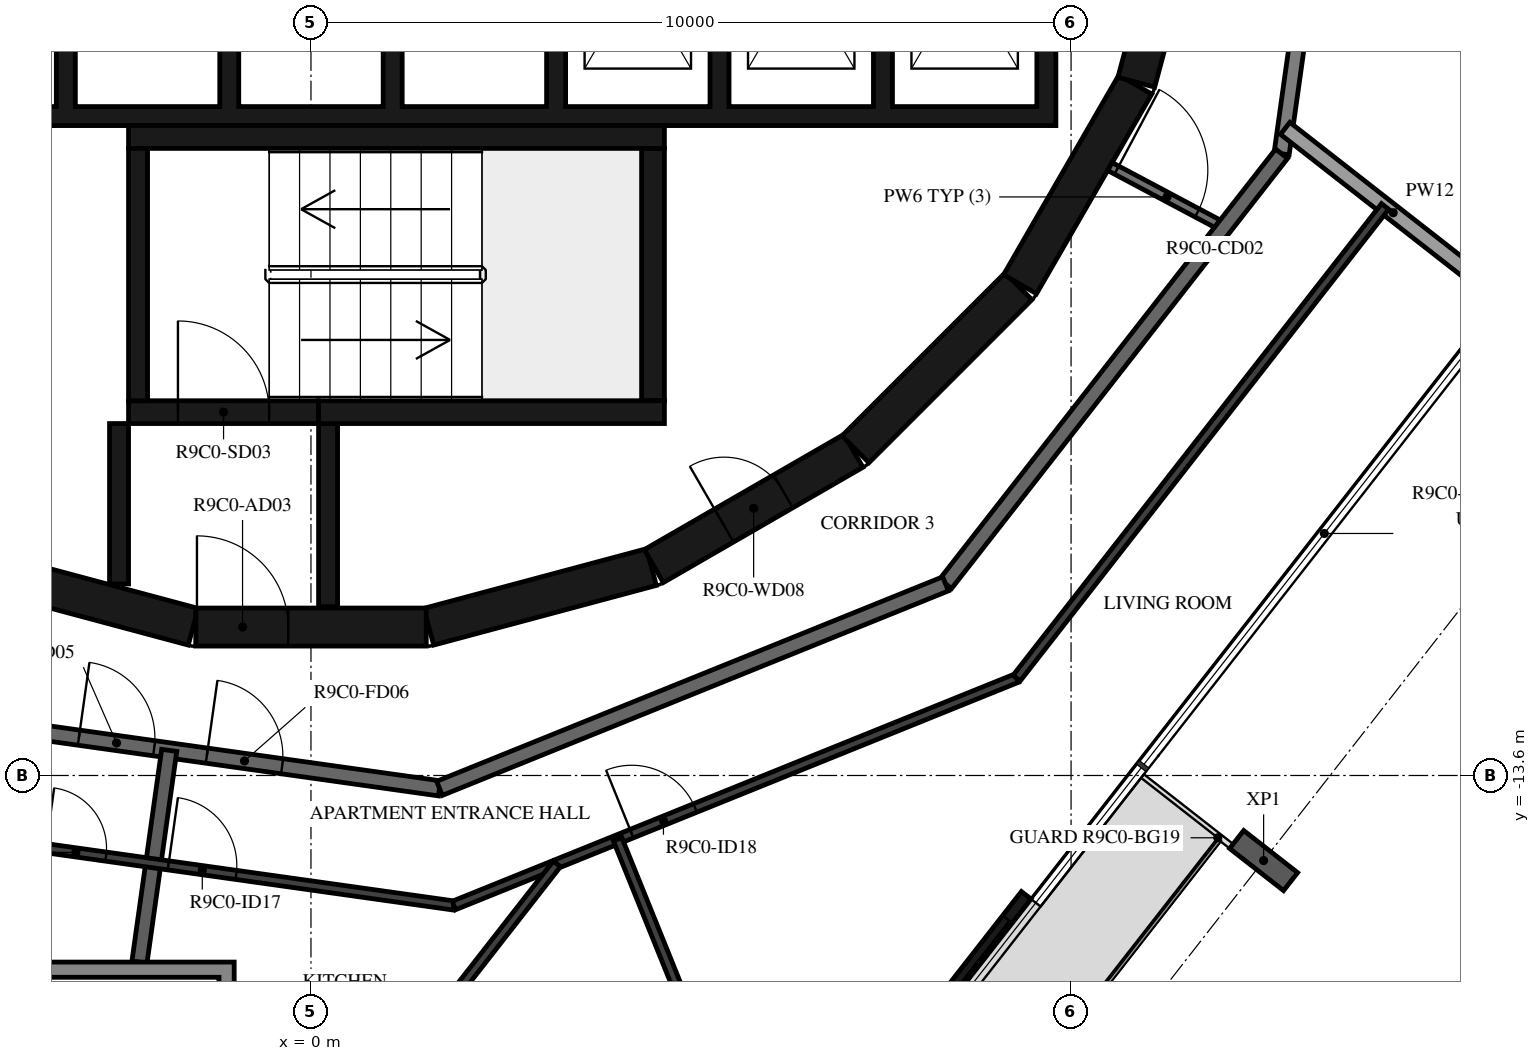
"""IFC4 building model, lengths in metres.
Left out: names, types, materials, properties, quantities, classifications, styles, units other than length and angle.
Written with IfcOpenShell. Run it as: python <this file> out.ifc"""

import sys

from ifc_helpers import new_model, si_unit, direction, frame, frame_2d, origin, origin_2d, place, context, subcontext, project, spatial, polyline, rectangle, i_section, outline, extrude, element, fill, save


model = new_model("IFC4")
c1 = context("Model", 3, precision=1e-05, world=origin(), true_north=direction((0.0, 1.0)))
c2 = subcontext(c1, "Body", "Model", "MODEL_VIEW")
j1 = project(units=[si_unit("LENGTHUNIT", "METRE"), si_unit("PLANEANGLEUNIT", "RADIAN")], contexts=[c1])
p1 = place(None, origin())
s1 = spatial("IfcSite", under=j1, at=p1, CompositionType="ELEMENT")
p2 = place(p1, origin())
s2 = spatial("IfcBuilding", under=s1, at=p2, CompositionType="ELEMENT")
p3 = place(p2, frame((0.0, 0.0, 354.0)))
s3 = spatial("IfcBuildingStorey", under=s2, at=p3, CompositionType="ELEMENT", Elevation=354.0)
p4 = place(p3, frame((12.533, -14.719, -0.38), z_axis=(0.0, 0.0, 1.0), x_axis=(-0.615661060634, -0.788011077599, 0.0)))
e1 = element("IfcColumn", 1, at=p4, inside=s3, PredefinedType="COLUMN", context=c2, shape_type="SweptSolid", body=[
    extrude(i_section(OverallWidth=0.3, OverallDepth=0.9, WebThickness=0.019, FlangeThickness=0.035, FilletRadius=0.03, at=origin_2d()), origin(), (0.0, 0.0, 1.0), 3.5),
])
p5 = place(p3, frame((7.44, -17.698, 0.0), z_axis=(0.0, 0.0, 1.0), x_axis=(0.615666248856, 0.788007024093, 0.0)))
e2 = element("IfcWall", 2, at=p5, inside=s3, PredefinedType="STANDARD", context=c2, shape_type="SweptSolid", body=[
    extrude(rectangle(XDim=3.2, YDim=0.16, at=frame_2d((1.6, 0.0))), origin(), (0.0, 0.0, 1.0), 3.12),
])
p6 = place(p5, frame((0.4, 0.0, 0.0)))
e3 = element("IfcOpeningElement", 3, at=p6, cuts=e2, PredefinedType="OPENING", context=c2, shape_type="SweptSolid", body=[
    extrude(rectangle(XDim=2.4, YDim=2.4, at=frame_2d((1.2, 1.2))), frame((0.0, 0.09, 0.0), z_axis=(0.0, -1.0, 0.0), x_axis=(1.0, 0.0, 0.0)), (0.0, 0.0, 1.0), 0.18),
])
p7 = place(p3, frame((1.55, -11.643, 0.0), z_axis=(0.0, 0.0, 1.0), x_axis=(0.965948410781, 0.258734743916, 0.0)))
e4 = element("IfcWall", 4, at=p7, inside=s3, PredefinedType="SHEAR", context=c2, shape_type="SweptSolid", body=[
    extrude(rectangle(XDim=3.033, YDim=0.5, at=frame_2d((1.516, 0.0))), origin(), (0.0, 0.0, 1.0), 3.12),
])
p8 = place(p3, frame((4.51, -10.845, 0.0), z_axis=(0.0, 0.0, 1.0), x_axis=(0.865975092491, 0.500087131594, 0.0)))
e5 = element("IfcWall", 5, at=p8, inside=s3, PredefinedType="SHEAR", context=c2, shape_type="SweptSolid", body=[
    extrude(rectangle(XDim=3.033, YDim=0.5, at=frame_2d((1.516, 0.0))), origin(), (0.0, 0.0, 1.0), 3.12),
])
p9 = place(p8, frame((1.066, 0.0, 0.0)))
e6 = element("IfcOpeningElement", 6, at=p9, cuts=e5, PredefinedType="OPENING", context=c2, shape_type="SweptSolid", body=[
    extrude(rectangle(XDim=0.9, YDim=2.1, at=frame_2d((0.45, 1.05))), frame((0.0, 0.26, 0.0), z_axis=(0.0, -1.0, 0.0), x_axis=(1.0, 0.0, 0.0)), (0.0, 0.0, 1.0), 0.52),
])
p10 = place(p3, frame((7.164, -9.308, 0.0), z_axis=(0.0, 0.0, 1.0), x_axis=(0.707106781187, 0.707106781187, 0.0)))
e7 = element("IfcWall", 7, at=p10, inside=s3, PredefinedType="SHEAR", context=c2, shape_type="SweptSolid", body=[
    extrude(rectangle(XDim=3.032, YDim=0.5, at=frame_2d((1.516, 0.0))), origin(), (0.0, 0.0, 1.0), 3.12),
])
for number, where, z_axis, x_axis in (
    (8, (9.329, -7.137, 0.0), (0.0, 0.0, 1.0), (0.5, 0.866, 0.0)),
    (9, (10.858, -4.479, 0.0), (0.0, 0.0, 1.0), (0.259, 0.966, 0.0)),
    (10, (-4.479, -10.858, 0.0), (0.0, 0.0, 1.0), (0.966, -0.259, 0.0)),
):
    element("IfcWall", number, at=place(p3, frame(where, z_axis=z_axis, x_axis=x_axis)), inside=s3, PredefinedType="SHEAR", context=c2, shape_type="SweptSolid", body=[
        extrude(rectangle(XDim=3.033, YDim=0.5, at=frame_2d((1.516, 0.0))), origin(), (0.0, 0.0, 1.0), 3.12),
    ])
p11 = place(p3, frame((-1.516, -11.647, 0.0), z_axis=(0.0, 0.0, 1.0), x_axis=(1.0, 0.0, 0.0)))
e11 = element("IfcWall", 11, at=p11, inside=s3, PredefinedType="SHEAR", context=c2, shape_type="SweptSolid", body=[
    extrude(rectangle(XDim=3.033, YDim=0.5, at=frame_2d((1.516, 0.0))), origin(), (0.0, 0.0, 1.0), 3.12),
])
p12 = place(p11, frame((0.016, 0.0, 0.0)))
e12 = element("IfcOpeningElement", 12, at=p12, cuts=e11, PredefinedType="OPENING", context=c2, shape_type="SweptSolid", body=[
    extrude(rectangle(XDim=1.2, YDim=2.1, at=frame_2d((0.6, 1.05))), frame((0.0, 0.26, 0.0), z_axis=(0.0, -1.0, 0.0), x_axis=(1.0, 0.0, 0.0)), (0.0, 0.0, 1.0), 0.52),
])
p13 = place(p3, frame((-2.275, -8.67, 0.0), z_axis=(0.0, 0.0, 1.0), x_axis=(0.0, 1.0, 0.0)))
e13 = element("IfcWall", 13, at=p13, inside=s3, PredefinedType="SHEAR", context=c2, shape_type="SweptSolid", body=[
    extrude(rectangle(XDim=3.32, YDim=0.25, at=frame_2d((1.66, 0.0))), origin(), (0.0, 0.0, 1.0), 3.12),
])
p14 = place(p3, frame((-2.4, -5.2, 0.0), z_axis=(0.0, 0.0, 1.0), x_axis=(1.0, 0.0, 0.0)))
e14 = element("IfcWall", 14, at=p14, inside=s3, PredefinedType="SHEAR", context=c2, shape_type="SweptSolid", body=[
    extrude(rectangle(XDim=7.05, YDim=0.3, at=frame_2d((3.525, 0.0))), origin(), (0.0, 0.0, 1.0), 3.12),
])
p15 = place(p3, frame((4.5, -8.67, 0.0), z_axis=(0.0, 0.0, 1.0), x_axis=(0.0, 1.0, 0.0)))
e15 = element("IfcWall", 15, at=p15, inside=s3, PredefinedType="SHEAR", context=c2, shape_type="SweptSolid", body=[
    extrude(rectangle(XDim=3.32, YDim=0.3, at=frame_2d((1.66, 0.0))), origin(), (0.0, 0.0, 1.0), 3.12),
])
p16 = place(p3, frame((0.1, -8.82, 0.0), z_axis=(0.0, 0.0, 1.0), x_axis=(1.0, 0.0, 0.0)))
e16 = element("IfcWall", 16, at=p16, inside=s3, PredefinedType="SHEAR", context=c2, shape_type="SweptSolid", body=[
    extrude(rectangle(XDim=4.55, YDim=0.3, at=frame_2d((2.275, 0.0))), origin(), (0.0, 0.0, 1.0), 3.12),
])
p17 = place(p3, frame((-2.4, -8.82, 0.0), z_axis=(0.0, 0.0, 1.0), x_axis=(1.0, 0.0, 0.0)))
e17 = element("IfcWall", 17, at=p17, inside=s3, PredefinedType="SHEAR", context=c2, shape_type="SweptSolid", body=[
    extrude(rectangle(XDim=2.5, YDim=0.3, at=frame_2d((1.25, 0.0))), origin(), (0.0, 0.0, 1.0), 3.12),
])
p18 = place(p17, frame((0.65, 0.0, 0.0)))
e18 = element("IfcOpeningElement", 18, at=p18, cuts=e17, PredefinedType="OPENING", context=c2, shape_type="SweptSolid", body=[
    extrude(rectangle(XDim=1.2, YDim=2.1, at=frame_2d((0.6, 1.05))), frame((0.0, 0.16, 0.0), z_axis=(0.0, -1.0, 0.0), x_axis=(1.0, 0.0, 0.0)), (0.0, 0.0, 1.0), 0.32),
])
p19 = place(p3, frame((-2.525, -8.97, 0.0), z_axis=(0.0, 0.0, 1.0), x_axis=(0.0, -1.0, 0.0)))
e19 = element("IfcWall", 19, at=p19, inside=s3, PredefinedType="SHEAR", context=c2, shape_type="SweptSolid", body=[
    extrude(rectangle(XDim=2.11, YDim=0.25, at=frame_2d((1.055, 0.0))), origin(), (0.0, 0.0, 1.0), 3.12),
])
p20 = place(p3, frame((0.225, -8.97, 0.0), z_axis=(0.0, 0.0, 1.0), x_axis=(0.0, -1.0, 0.0)))
e20 = element("IfcWall", 20, at=p20, inside=s3, PredefinedType="SHEAR", context=c2, shape_type="SweptSolid", body=[
    extrude(rectangle(XDim=2.41, YDim=0.25, at=frame_2d((1.205, 0.0))), origin(), (0.0, 0.0, 1.0), 3.12),
])
p21 = place(p3, origin())
e21 = element("IfcWall", 21, at=p21, inside=s3, PredefinedType="SHEAR", context=c2, shape_type="SweptSolid", body=[
    extrude(outline(polyline([(9.8, -5.05), (9.8, -4.8), (9.8, -1.9), (9.55, -1.9), (9.55, -4.8), (7.65, -4.8), (7.65, -1.9), (7.4, -1.9), (7.4, -4.8), (5.5, -4.8), (5.5, -1.9), (5.25, -1.9), (5.25, -4.8), (3.35, -4.8), (3.35, -1.9), (3.1, -1.9), (3.1, -4.8), (1.2, -4.8), (1.2, -1.9), (0.95, -1.9), (0.95, -4.8), (-0.95, -4.8), (-0.95, -1.9), (-1.2, -1.9), (-1.2, -4.8), (-3.1, -4.8), (-3.1, -1.9), (-3.35, -1.9), (-3.35, -4.8), (-5.25, -4.8), (-5.25, -1.9), (-5.5, -1.9), (-5.5, -4.8), (-9.55, -4.8), (-9.55, -1.9), (-9.8, -1.9), (-9.8, -4.8), (-9.8, -5.05), (9.8, -5.05)])), origin(), (0.0, 0.0, 1.0), 3.12),
])
p22 = place(p3, frame((10.511, -5.589, 0.0), z_axis=(0.0, 0.0, 1.0), x_axis=(0.882959677414, -0.469448834337, 0.0)))
e22 = element("IfcWall", 22, at=p22, inside=s3, PredefinedType="PARTITIONING", context=c2, shape_type="SweptSolid", body=[
    extrude(rectangle(XDim=1.702, YDim=0.12, at=frame_2d((0.851, 0.0))), origin(), (0.0, 0.0, 1.0), 3.12),
])
p23 = place(p22, frame((0.1, 0.0, 0.0)))
e23 = element("IfcOpeningElement", 23, at=p23, cuts=e22, PredefinedType="OPENING", context=c2, shape_type="SweptSolid", body=[
    extrude(rectangle(XDim=1.2, YDim=2.1, at=frame_2d((0.6, 1.05))), frame((0.0, 0.07, 0.0), z_axis=(0.0, -1.0, 0.0), x_axis=(1.0, 0.0, 0.0)), (0.0, 0.0, 1.0), 0.14),
])
p24 = place(p3, frame((12.77, -5.42, 0.0), z_axis=(0.0, 0.0, 1.0), x_axis=(0.139155334385, 0.990270565508, 0.0)))
e24 = element("IfcWall", 24, at=p24, inside=s3, PredefinedType="STANDARD", context=c2, shape_type="SweptSolid", body=[
    extrude(rectangle(XDim=7.181, YDim=0.2, at=frame_2d((3.59, 0.0))), origin(), (0.0, 0.0, 1.0), 3.12),
])
p25 = place(p24, frame((2.039, 0.0, 0.0)))
e25 = element("IfcOpeningElement", 25, at=p25, cuts=e24, PredefinedType="OPENING", context=c2, shape_type="SweptSolid", body=[
    extrude(rectangle(XDim=1.8, YDim=2.1, at=frame_2d((0.9, 1.05))), frame((0.0, 0.11, 0.0), z_axis=(0.0, -1.0, 0.0), x_axis=(1.0, 0.0, 0.0)), (0.0, 0.0, 1.0), 0.22),
])
p26 = place(p3, frame((8.349, -11.079, 0.0), z_axis=(0.0, 0.0, 1.0), x_axis=(0.615669112324, 0.78800478687, 0.0)))
e26 = element("IfcWall", 26, at=p26, inside=s3, PredefinedType="STANDARD", context=c2, shape_type="SweptSolid", body=[
    extrude(rectangle(XDim=7.181, YDim=0.2, at=frame_2d((3.591, 0.0))), origin(), (0.0, 0.0, 1.0), 3.12),
])
p27 = place(p3, frame((-5.42, -12.77, 0.0), z_axis=(0.0, 0.0, 1.0), x_axis=(0.990270565508, -0.139155334385, 0.0)))
e27 = element("IfcWall", 27, at=p27, inside=s3, PredefinedType="STANDARD", context=c2, shape_type="SweptSolid", body=[
    extrude(rectangle(XDim=7.181, YDim=0.2, at=frame_2d((3.59, 0.0))), origin(), (0.0, 0.0, 1.0), 3.12),
])
p28 = place(p27, frame((2.39, 0.0, 0.0)))
e28 = element("IfcOpeningElement", 28, at=p28, cuts=e27, PredefinedType="OPENING", context=c2, shape_type="SweptSolid", body=[
    extrude(rectangle(XDim=1.0, YDim=2.1, at=frame_2d((0.5, 1.05))), frame((0.0, 0.11, 0.0), z_axis=(0.0, -1.0, 0.0), x_axis=(1.0, 0.0, 0.0)), (0.0, 0.0, 1.0), 0.22),
])
p29 = place(p27, frame((4.091, 0.0, 0.0)))
e29 = element("IfcOpeningElement", 29, at=p29, cuts=e27, PredefinedType="OPENING", context=c2, shape_type="SweptSolid", body=[
    extrude(rectangle(XDim=1.0, YDim=2.1, at=frame_2d((0.5, 1.05))), frame((0.0, 0.11, 0.0), z_axis=(0.0, -1.0, 0.0), x_axis=(1.0, 0.0, 0.0)), (0.0, 0.0, 1.0), 0.22),
])
p30 = place(p3, frame((1.691, -13.769, 0.0), z_axis=(0.0, 0.0, 1.0), x_axis=(0.92717916932, 0.374618189599, 0.0)))
e30 = element("IfcWall", 30, at=p30, inside=s3, PredefinedType="STANDARD", context=c2, shape_type="SweptSolid", body=[
    extrude(rectangle(XDim=7.181, YDim=0.2, at=frame_2d((3.591, 0.0))), origin(), (0.0, 0.0, 1.0), 3.12),
])
p31 = place(p3, frame((12.817, -5.086, 0.0), z_axis=(0.0, 0.0, 1.0), x_axis=(0.787994616725, -0.615682129034, 0.0)))
e31 = element("IfcWall", 31, at=p31, inside=s3, PredefinedType="STANDARD", context=c2, shape_type="SweptSolid", body=[
    extrude(rectangle(XDim=3.607, YDim=0.2, at=frame_2d((1.804, 0.0))), origin(), (0.0, 0.0, 1.0), 2.73),
])
p32 = place(p3, frame((-2.256, -16.055, 0.0), z_axis=(0.0, 0.0, 1.0), x_axis=(0.139148428478, 0.990271535919, 0.0)))
e32 = element("IfcWall", 32, at=p32, inside=s3, PredefinedType="STANDARD", context=c2, shape_type="SweptSolid", body=[
    extrude(rectangle(XDim=2.812, YDim=0.2, at=frame_2d((1.406, 0.0))), origin(), (0.0, 0.0, 1.0), 3.12),
])
p33 = place(p3, frame((-3.688, -14.528, 0.0), z_axis=(0.0, 0.0, 1.0), x_axis=(0.990273413633, -0.139135064782, 0.0)))
e33 = element("IfcWall", 33, at=p33, inside=s3, PredefinedType="PARTITIONING", context=c2, shape_type="SweptSolid", body=[
    extrude(rectangle(XDim=5.622, YDim=0.12, at=frame_2d((2.811, 0.0))), origin(), (0.0, 0.0, 1.0), 3.12),
])
p34 = place(p33, frame((0.2, 0.0, 0.0)))
e34 = element("IfcOpeningElement", 34, at=p34, cuts=e33, PredefinedType="OPENING", context=c2, shape_type="SweptSolid", body=[
    extrude(rectangle(XDim=0.8, YDim=2.1, at=frame_2d((0.4, 1.05))), frame((0.0, 0.07, 0.0), z_axis=(0.0, -1.0, 0.0), x_axis=(1.0, 0.0, 0.0)), (0.0, 0.0, 1.0), 0.14),
])
p35 = place(p33, frame((1.83, 0.0, 0.0)))
e35 = element("IfcOpeningElement", 35, at=p35, cuts=e33, PredefinedType="OPENING", context=c2, shape_type="SweptSolid", body=[
    extrude(rectangle(XDim=0.9, YDim=2.1, at=frame_2d((0.45, 1.05))), frame((0.0, 0.07, 0.0), z_axis=(0.0, -1.0, 0.0), x_axis=(1.0, 0.0, 0.0)), (0.0, 0.0, 1.0), 0.14),
])
p36 = place(p3, frame((1.88, -15.311, 0.0), z_axis=(0.0, 0.0, 1.0), x_axis=(0.927184866592, 0.374604088557, 0.0)))
e36 = element("IfcWall", 36, at=p36, inside=s3, PredefinedType="PARTITIONING", context=c2, shape_type="SweptSolid", body=[
    extrude(rectangle(XDim=7.985, YDim=0.12, at=frame_2d((3.993, 0.0))), origin(), (0.0, 0.0, 1.0), 3.12),
])
p37 = place(p36, frame((2.524, 0.0, 0.0)))
e37 = element("IfcOpeningElement", 37, at=p37, cuts=e36, PredefinedType="OPENING", context=c2, shape_type="SweptSolid", body=[
    extrude(rectangle(XDim=0.9, YDim=2.1, at=frame_2d((0.45, 1.05))), frame((0.0, 0.07, 0.0), z_axis=(0.0, -1.0, 0.0), x_axis=(1.0, 0.0, 0.0)), (0.0, 0.0, 1.0), 0.14),
])
p38 = place(p3, frame((9.283, -12.319, 0.0), z_axis=(0.0, 0.0, 1.0), x_axis=(0.615666903036, 0.788006512985, 0.0)))
e38 = element("IfcWall", 38, at=p38, inside=s3, PredefinedType="PARTITIONING", context=c2, shape_type="SweptSolid", body=[
    extrude(rectangle(XDim=7.875, YDim=0.12, at=frame_2d((3.938, 0.0))), origin(), (0.0, 0.0, 1.0), 3.12),
])
p39 = place(p3, frame((-0.067, -18.99, 0.0), z_axis=(0.0, 0.0, 1.0), x_axis=(0.615678487989, 0.787997461562, 0.0)))
e39 = element("IfcWall", 39, at=p39, inside=s3, PredefinedType="PARTITIONING", context=c2, shape_type="SweptSolid", body=[
    extrude(rectangle(XDim=5.364, YDim=0.12, at=frame_2d((2.682, 0.0))), origin(), (0.0, 0.0, 1.0), 3.12),
])
p40 = place(p39, frame((0.2, 0.0, 0.0)))
e40 = element("IfcOpeningElement", 40, at=p40, cuts=e39, PredefinedType="OPENING", context=c2, shape_type="SweptSolid", body=[
    extrude(rectangle(XDim=0.8, YDim=2.1, at=frame_2d((0.4, 1.05))), frame((0.0, 0.07, 0.0), z_axis=(0.0, -1.0, 0.0), x_axis=(1.0, 0.0, 0.0)), (0.0, 0.0, 1.0), 0.14),
])
p41 = place(p3, frame((6.097, -19.546, 0.0), z_axis=(0.0, 0.0, 1.0), x_axis=(-0.374591330213, 0.927190021155, 0.0)))
e41 = element("IfcWall", 41, at=p41, inside=s3, PredefinedType="PARTITIONING", context=c2, shape_type="SweptSolid", body=[
    extrude(rectangle(XDim=5.507, YDim=0.12, at=frame_2d((2.753, 0.0))), origin(), (0.0, 0.0, 1.0), 3.12),
])
p42 = place(p41, frame((0.4, 0.0, 0.0)))
e42 = element("IfcOpeningElement", 42, at=p42, cuts=e41, PredefinedType="OPENING", context=c2, shape_type="SweptSolid", body=[
    extrude(rectangle(XDim=0.9, YDim=2.1, at=frame_2d((0.45, 1.05))), frame((0.0, 0.07, 0.0), z_axis=(0.0, -1.0, 0.0), x_axis=(1.0, 0.0, 0.0)), (0.0, 0.0, 1.0), 0.14),
])
p43 = place(p3, origin())
e43 = element("IfcWall", 43, at=p43, inside=s3, PredefinedType="STANDARD", context=c2, shape_type="SweptSolid", body=[
    extrude(outline(polyline([(-1.01, -16.055), (-1.01, -18.955), (-3.91, -18.955), (-3.91, -16.055), (-1.01, -16.055)]), holes=[polyline([(-3.71, -18.755), (-1.21, -18.755), (-1.21, -16.255), (-3.71, -16.255), (-3.71, -18.755)])]), origin(), (0.0, 0.0, 1.0), 3.12),
])
p44 = place(p6, origin())
e44 = element("IfcDoor", 44, at=p44, inside=s3, OperationType="DOUBLE_DOOR_SLIDING", PredefinedType="DOOR", context=c2, shape_type="SweptSolid", body=[
    extrude(rectangle(XDim=2.4, YDim=2.4, at=frame_2d((1.2, 1.2))), frame((0.0, 0.025, 0.0), z_axis=(0.0, -1.0, 0.0), x_axis=(1.0, 0.0, 0.0)), (0.0, 0.0, 1.0), 0.05),
])
fill(e3, e44)
p45 = place(p18, origin())
e45 = element("IfcDoor", 45, at=p45, inside=s3, OperationType="SINGLE_SWING_LEFT", PredefinedType="DOOR", context=c2, shape_type="SweptSolid", body=[
    extrude(rectangle(XDim=1.2, YDim=2.1, at=frame_2d((0.6, 1.05))), frame((0.0, 0.025, 0.0), z_axis=(0.0, -1.0, 0.0), x_axis=(1.0, 0.0, 0.0)), (0.0, 0.0, 1.0), 0.05),
])
fill(e18, e45)
p46 = place(p12, origin())
e46 = element("IfcDoor", 46, at=p46, inside=s3, OperationType="SINGLE_SWING_RIGHT", PredefinedType="DOOR", context=c2, shape_type="SweptSolid", body=[
    extrude(rectangle(XDim=1.2, YDim=2.1, at=frame_2d((0.6, 1.05))), frame((0.0, 0.025, 0.0), z_axis=(0.0, -1.0, 0.0), x_axis=(1.0, 0.0, 0.0)), (0.0, 0.0, 1.0), 0.05),
])
fill(e12, e46)
p47 = place(p9, origin())
e47 = element("IfcDoor", 47, at=p47, inside=s3, OperationType="SINGLE_SWING_RIGHT", PredefinedType="DOOR", context=c2, shape_type="SweptSolid", body=[
    extrude(rectangle(XDim=0.9, YDim=2.1, at=frame_2d((0.45, 1.05))), frame((0.0, 0.025, 0.0), z_axis=(0.0, -1.0, 0.0), x_axis=(1.0, 0.0, 0.0)), (0.0, 0.0, 1.0), 0.05),
])
fill(e6, e47)
p48 = place(p28, origin())
e48 = element("IfcDoor", 48, at=p48, inside=s3, OperationType="SINGLE_SWING_RIGHT", PredefinedType="DOOR", context=c2, shape_type="SweptSolid", body=[
    extrude(rectangle(XDim=1.0, YDim=2.1, at=frame_2d((0.5, 1.05))), frame((0.0, 0.025, 0.0), z_axis=(0.0, -1.0, 0.0), x_axis=(1.0, 0.0, 0.0)), (0.0, 0.0, 1.0), 0.05),
])
fill(e28, e48)
p49 = place(p34, origin())
e49 = element("IfcDoor", 49, at=p49, inside=s3, OperationType="SINGLE_SWING_RIGHT", PredefinedType="DOOR", context=c2, shape_type="SweptSolid", body=[
    extrude(rectangle(XDim=0.8, YDim=2.1, at=frame_2d((0.4, 1.05))), frame((0.0, 0.025, 0.0), z_axis=(0.0, -1.0, 0.0), x_axis=(1.0, 0.0, 0.0)), (0.0, 0.0, 1.0), 0.05),
])
fill(e34, e49)
p50 = place(p29, origin())
e50 = element("IfcDoor", 50, at=p50, inside=s3, OperationType="SINGLE_SWING_RIGHT", PredefinedType="DOOR", context=c2, shape_type="SweptSolid", body=[
    extrude(rectangle(XDim=1.0, YDim=2.1, at=frame_2d((0.5, 1.05))), frame((0.0, 0.025, 0.0), z_axis=(0.0, -1.0, 0.0), x_axis=(1.0, 0.0, 0.0)), (0.0, 0.0, 1.0), 0.05),
])
fill(e29, e50)
p51 = place(p35, origin())
e51 = element("IfcDoor", 51, at=p51, inside=s3, OperationType="SINGLE_SWING_RIGHT", PredefinedType="DOOR", context=c2, shape_type="SweptSolid", body=[
    extrude(rectangle(XDim=0.9, YDim=2.1, at=frame_2d((0.45, 1.05))), frame((0.0, 0.025, 0.0), z_axis=(0.0, -1.0, 0.0), x_axis=(1.0, 0.0, 0.0)), (0.0, 0.0, 1.0), 0.05),
])
fill(e35, e51)
p52 = place(p37, origin())
e52 = element("IfcDoor", 52, at=p52, inside=s3, OperationType="SINGLE_SWING_LEFT", PredefinedType="DOOR", context=c2, shape_type="SweptSolid", body=[
    extrude(rectangle(XDim=0.9, YDim=2.1, at=frame_2d((0.45, 1.05))), frame((0.0, 0.025, 0.0), z_axis=(0.0, -1.0, 0.0), x_axis=(1.0, 0.0, 0.0)), (0.0, 0.0, 1.0), 0.05),
])
fill(e37, e52)
p53 = place(p23, origin())
e53 = element("IfcDoor", 53, at=p53, inside=s3, OperationType="DOUBLE_DOOR_SINGLE_SWING", PredefinedType="DOOR", context=c2, shape_type="SweptSolid", body=[
    extrude(rectangle(XDim=1.2, YDim=2.1, at=frame_2d((0.6, 1.05))), frame((0.0, 0.025, 0.0), z_axis=(0.0, -1.0, 0.0), x_axis=(1.0, 0.0, 0.0)), (0.0, 0.0, 1.0), 0.05),
])
fill(e23, e53)
save(model, sys.argv[1])
